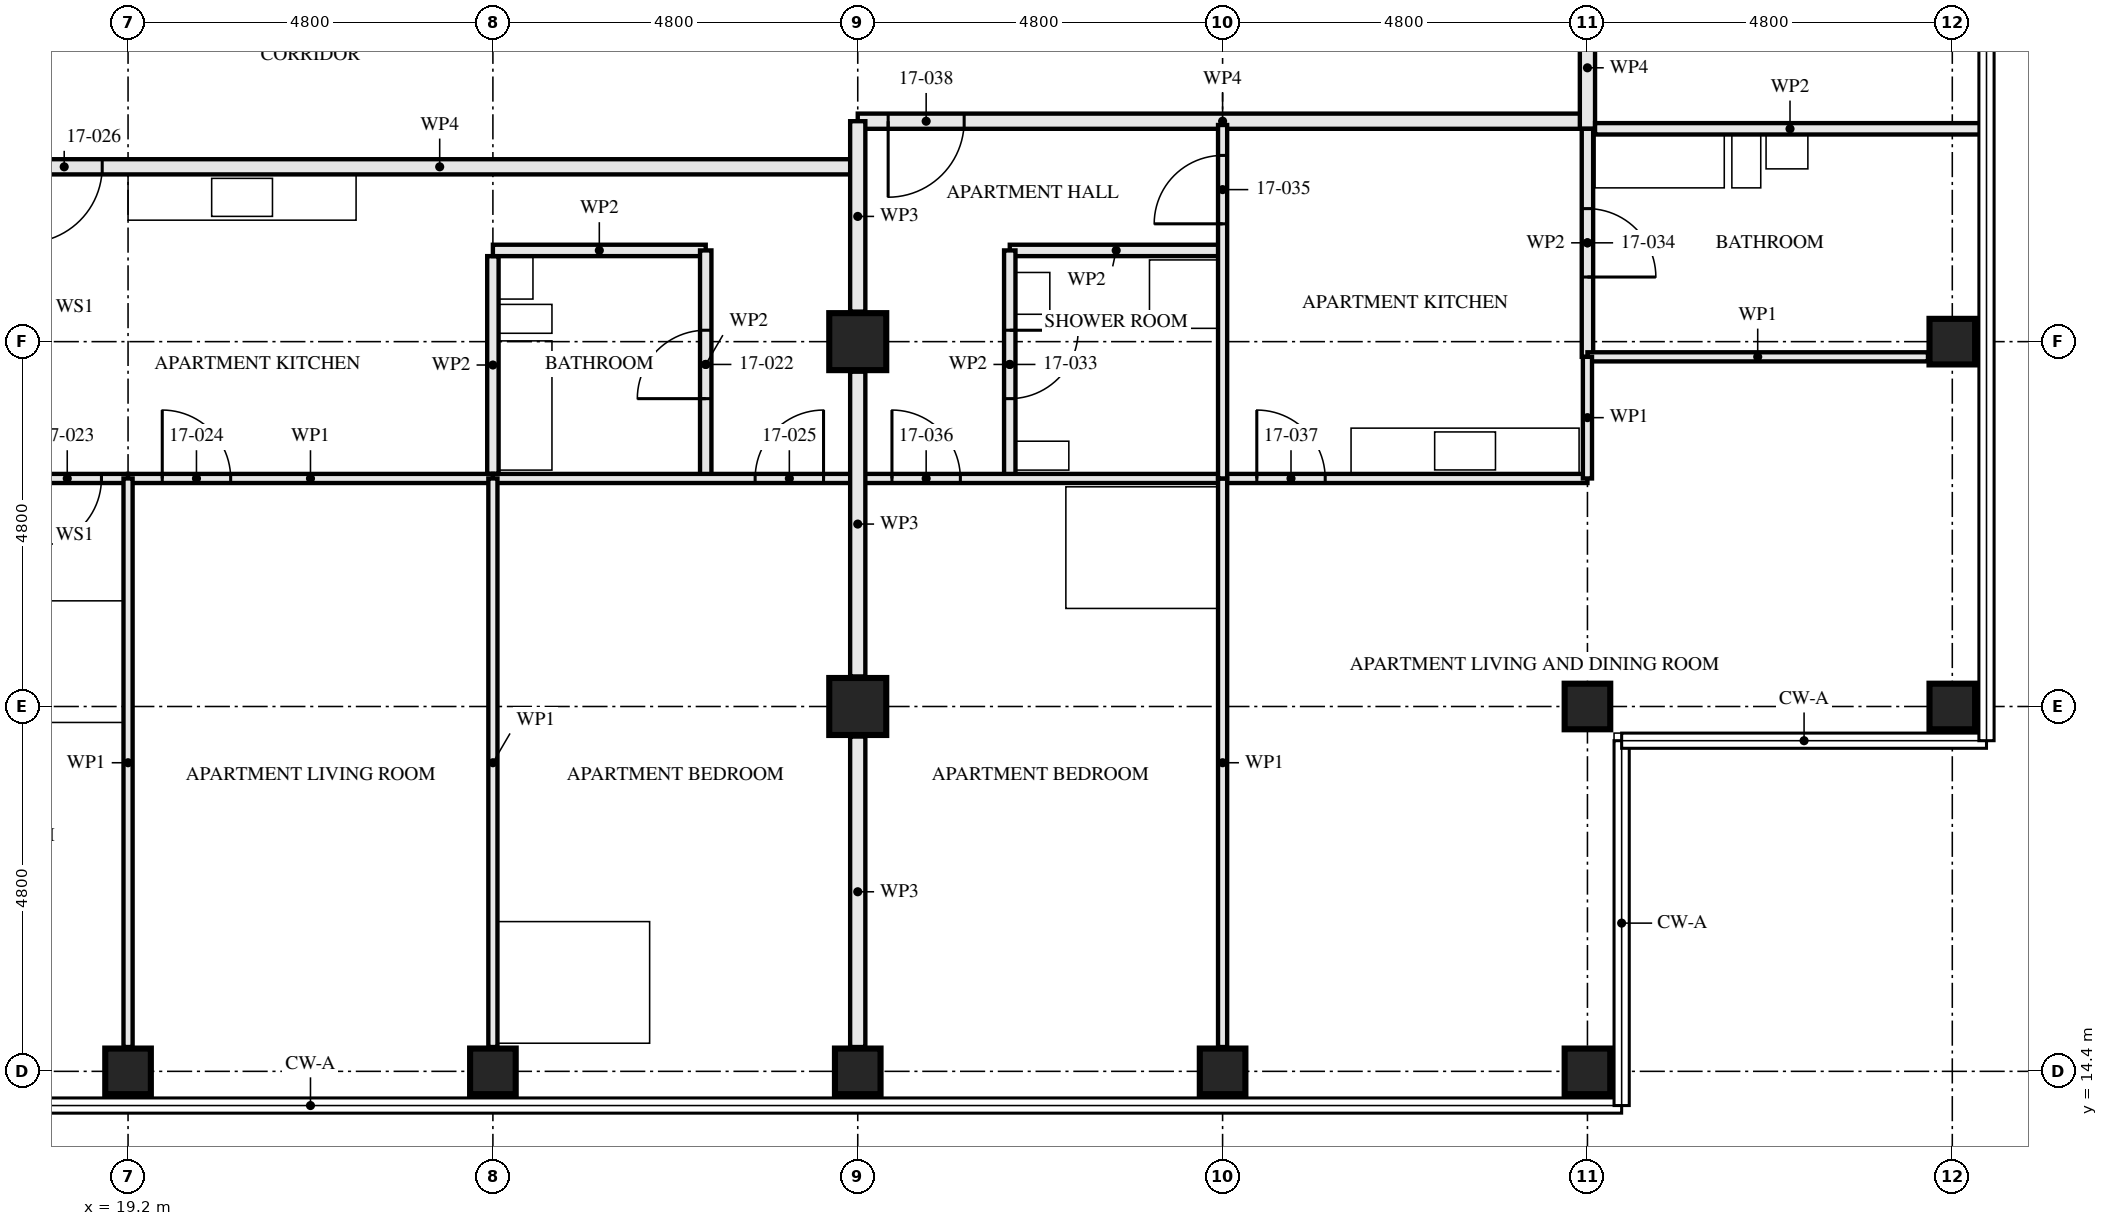
"""IFC4 building model, lengths in metres.
Left out: names, types, materials, properties, quantities, classifications, styles, units other than length and angle.
Written with IfcOpenShell. Run it as: python <this file> out.ifc"""

import sys

from ifc_helpers import new_model, si_unit, direction, frame, frame_2d, origin, origin_2d, place, context, subcontext, project, spatial, rectangle, hollow_rectangle, extrude, element, fill, save


model = new_model("IFC4")
c1 = context("Model", 3, precision=1e-05, world=origin(), true_north=direction((0.0, 1.0)))
c2 = subcontext(c1, "Body", "Model", "MODEL_VIEW")
j1 = project(units=[si_unit("LENGTHUNIT", "METRE"), si_unit("PLANEANGLEUNIT", "RADIAN")], contexts=[c1])
p1 = place(None, origin())
s1 = spatial("IfcSite", under=j1, at=p1, CompositionType="ELEMENT")
p2 = place(p1, origin())
s2 = spatial("IfcBuilding", under=s1, at=p2, CompositionType="ELEMENT")
p3 = place(p2, frame((0.0, 0.0, 65.5)))
s3 = spatial("IfcBuildingStorey", under=s2, at=p3, CompositionType="ELEMENT", Elevation=65.5)
for number, where, z_axis, x_axis in (
    (1, (19.2, 14.4, 0.0), (0.0, 0.0, 1.0), (0.0, 1.0, 0.0)),
    (2, (24.0, 14.4, 0.0), (0.0, 0.0, 1.0), (0.0, 1.0, 0.0)),
    (3, (28.8, 14.4, 0.0), (0.0, 0.0, 1.0), (0.0, 1.0, 0.0)),
):
    element("IfcColumn", number, at=place(p3, frame(where, z_axis=z_axis, x_axis=x_axis)), inside=s3, PredefinedType="COLUMN", context=c2, shape_type="SweptSolid", body=[
        extrude(hollow_rectangle(XDim=0.6, YDim=0.6, WallThickness=0.08, at=origin_2d()), origin(), (0.0, 0.0, 1.0), 3.5),
    ])
for number, where, z_axis, x_axis in (
    (4, (28.8, 19.2, 0.0), (0.0, 0.0, 1.0), (1.0, 0.0, 0.0)),
    (5, (28.8, 24.0, 0.0), (0.0, 0.0, 1.0), (1.0, 0.0, 0.0)),
):
    element("IfcColumn", number, at=place(p3, frame(where, z_axis=z_axis, x_axis=x_axis)), inside=s3, PredefinedType="COLUMN", context=c2, shape_type="SweptSolid", body=[
        extrude(hollow_rectangle(XDim=0.75, YDim=0.75, WallThickness=0.08, at=origin_2d()), origin(), (0.0, 0.0, 1.0), 3.5),
    ])
for number, where, z_axis, x_axis in (
    (6, (33.6, 14.4, 0.0), (0.0, 0.0, 1.0), (0.0, 1.0, 0.0)),
    (7, (38.4, 14.4, 0.0), (0.0, 0.0, 1.0), (0.0, 1.0, 0.0)),
    (8, (38.4, 19.2, 0.0), (0.0, 0.0, 1.0), (0.0, 1.0, 0.0)),
    (9, (43.2, 19.2, 0.0), (0.0, 0.0, 1.0), (0.0, 1.0, 0.0)),
    (10, (43.2, 24.0, 0.0), (0.0, 0.0, 1.0), (1.0, 0.0, 0.0)),
):
    element("IfcColumn", number, at=place(p3, frame(where, z_axis=z_axis, x_axis=x_axis)), inside=s3, PredefinedType="COLUMN", context=c2, shape_type="SweptSolid", body=[
        extrude(hollow_rectangle(XDim=0.6, YDim=0.6, WallThickness=0.08, at=origin_2d()), origin(), (0.0, 0.0, 1.0), 3.5),
    ])
p4 = place(p3, frame((26.8, 22.2, 0.0), z_axis=(0.0, 0.0, 1.0), x_axis=(0.0, 1.0, 0.0)))
e11 = element("IfcWall", 11, at=p4, inside=s3, PredefinedType="PARTITIONING", context=c2, shape_type="SweptSolid", body=[
    extrude(rectangle(XDim=3.0, YDim=0.15, at=frame_2d((1.5, 0.0))), origin(), (0.0, 0.0, 1.0), 2.55),
])
p5 = place(p4, frame((1.05, 0.0, 0.0)))
e12 = element("IfcOpeningElement", 12, at=p5, cuts=e11, PredefinedType="OPENING", context=c2, shape_type="SweptSolid", body=[
    extrude(rectangle(XDim=0.9, YDim=2.1, at=frame_2d((0.45, 1.05))), frame((0.0, 0.085, 0.0), z_axis=(0.0, -1.0, 0.0), x_axis=(1.0, 0.0, 0.0)), (0.0, 0.0, 1.0), 0.171),
])
p6 = place(p3, frame((24.0, 25.2, 0.0), z_axis=(0.0, 0.0, 1.0), x_axis=(1.0, 0.0, 0.0)))
e13 = element("IfcWall", 13, at=p6, inside=s3, PredefinedType="PARTITIONING", context=c2, shape_type="SweptSolid", body=[
    extrude(rectangle(XDim=2.8, YDim=0.15, at=frame_2d((1.4, 0.0))), origin(), (0.0, 0.0, 1.0), 3.33),
])
p7 = place(p3, frame((17.8, 22.2, 0.0), z_axis=(0.0, 0.0, 1.0), x_axis=(1.0, 0.0, 0.0)))
e14 = element("IfcWall", 14, at=p7, inside=s3, PredefinedType="PARTITIONING", context=c2, shape_type="SweptSolid", body=[
    extrude(rectangle(XDim=1.4, YDim=0.12, at=frame_2d((0.7, 0.0))), origin(), (0.0, 0.0, 1.0), 3.33),
])
p8 = place(p7, frame((0.15, 0.0, 0.0)))
e15 = element("IfcOpeningElement", 15, at=p8, cuts=e14, PredefinedType="OPENING", context=c2, shape_type="SweptSolid", body=[
    extrude(rectangle(XDim=0.9, YDim=2.1, at=frame_2d((0.45, 1.05))), frame((0.0, 0.071, 0.0), z_axis=(0.0, -1.0, 0.0), x_axis=(1.0, 0.0, 0.0)), (0.0, 0.0, 1.0), 0.141),
])
p9 = place(p3, frame((19.2, 22.2, 0.0), z_axis=(0.0, 0.0, 1.0), x_axis=(1.0, 0.0, 0.0)))
e16 = element("IfcWall", 16, at=p9, inside=s3, PredefinedType="PARTITIONING", context=c2, shape_type="SweptSolid", body=[
    extrude(rectangle(XDim=4.8, YDim=0.12, at=frame_2d((2.4, 0.0))), origin(), (0.0, 0.0, 1.0), 3.33),
])
p10 = place(p9, frame((0.45, 0.0, 0.0)))
e17 = element("IfcOpeningElement", 17, at=p10, cuts=e16, PredefinedType="OPENING", context=c2, shape_type="SweptSolid", body=[
    extrude(rectangle(XDim=0.9, YDim=2.1, at=frame_2d((0.45, 1.05))), frame((0.0, 0.071, 0.0), z_axis=(0.0, -1.0, 0.0), x_axis=(1.0, 0.0, 0.0)), (0.0, 0.0, 1.0), 0.141),
])
p11 = place(p3, frame((24.0, 22.2, 0.0), z_axis=(0.0, 0.0, 1.0), x_axis=(1.0, 0.0, 0.0)))
e18 = element("IfcWall", 18, at=p11, inside=s3, PredefinedType="PARTITIONING", context=c2, shape_type="SweptSolid", body=[
    extrude(rectangle(XDim=4.8, YDim=0.12, at=frame_2d((2.4, 0.0))), origin(), (0.0, 0.0, 1.0), 3.33),
])
p12 = place(p11, frame((3.45, 0.0, 0.0)))
e19 = element("IfcOpeningElement", 19, at=p12, cuts=e18, PredefinedType="OPENING", context=c2, shape_type="SweptSolid", body=[
    extrude(rectangle(XDim=0.9, YDim=2.1, at=frame_2d((0.45, 1.05))), frame((0.0, 0.071, 0.0), z_axis=(0.0, -1.0, 0.0), x_axis=(1.0, 0.0, 0.0)), (0.0, 0.0, 1.0), 0.141),
])
for number, where, z_axis, x_axis in (
    (20, (19.2, 14.72, 0.0), (0.0, 0.0, 1.0), (0.0, 1.0, 0.0)),
    (21, (24.0, 14.72, 0.0), (0.0, 0.0, 1.0), (0.0, 1.0, 0.0)),
):
    element("IfcWall", number, at=place(p3, frame(where, z_axis=z_axis, x_axis=x_axis)), inside=s3, PredefinedType="PARTITIONING", context=c2, shape_type="SweptSolid", body=[
        extrude(rectangle(XDim=7.48, YDim=0.12, at=frame_2d((3.74, 0.0))), origin(), (0.0, 0.0, 1.0), 2.55),
    ])
p13 = place(p3, frame((17.8, 26.3, 0.0), z_axis=(0.0, 0.0, 1.0), x_axis=(1.0, 0.0, 0.0)))
e22 = element("IfcWall", 22, at=p13, inside=s3, PredefinedType="PARTITIONING", context=c2, shape_type="SweptSolid", body=[
    extrude(rectangle(XDim=11.0, YDim=0.2, at=frame_2d((5.5, 0.0))), origin(), (0.0, 0.0, 1.0), 2.55),
])
p14 = place(p13, frame((0.06, 0.0, 0.0)))
e23 = element("IfcOpeningElement", 23, at=p14, cuts=e22, PredefinedType="OPENING", context=c2, shape_type="SweptSolid", body=[
    extrude(rectangle(XDim=1.0, YDim=2.1, at=frame_2d((0.5, 1.05))), frame((0.0, 0.111, 0.0), z_axis=(0.0, -1.0, 0.0), x_axis=(1.0, 0.0, 0.0)), (0.0, 0.0, 1.0), 0.221),
])
p15 = place(p3, frame((30.8, 22.2, 0.0), z_axis=(0.0, 0.0, 1.0), x_axis=(0.0, 1.0, 0.0)))
e24 = element("IfcWall", 24, at=p15, inside=s3, PredefinedType="PARTITIONING", context=c2, shape_type="SweptSolid", body=[
    extrude(rectangle(XDim=3.0, YDim=0.15, at=frame_2d((1.5, 0.0))), origin(), (0.0, 0.0, 1.0), 2.55),
])
p16 = place(p15, frame((1.05, 0.0, 0.0)))
e25 = element("IfcOpeningElement", 25, at=p16, cuts=e24, PredefinedType="OPENING", context=c2, shape_type="SweptSolid", body=[
    extrude(rectangle(XDim=0.9, YDim=2.1, at=frame_2d((0.45, 1.05))), frame((0.0, 0.085, 0.0), z_axis=(0.0, -1.0, 0.0), x_axis=(1.0, 0.0, 0.0)), (0.0, 0.0, 1.0), 0.171),
])
p17 = place(p3, frame((30.8, 25.2, 0.0), z_axis=(0.0, 0.0, 1.0), x_axis=(1.0, 0.0, 0.0)))
e26 = element("IfcWall", 26, at=p17, inside=s3, PredefinedType="PARTITIONING", context=c2, shape_type="SweptSolid", body=[
    extrude(rectangle(XDim=2.8, YDim=0.15, at=frame_2d((1.4, 0.0))), origin(), (0.0, 0.0, 1.0), 3.33),
])
p18 = place(p3, frame((38.4, 23.8, 0.0), z_axis=(0.0, 0.0, 1.0), x_axis=(0.0, 1.0, 0.0)))
e27 = element("IfcWall", 27, at=p18, inside=s3, PredefinedType="PARTITIONING", context=c2, shape_type="SweptSolid", body=[
    extrude(rectangle(XDim=3.0, YDim=0.15, at=frame_2d((1.5, 0.0))), origin(), (0.0, 0.0, 1.0), 2.55),
])
p19 = place(p18, frame((1.05, 0.0, 0.0)))
e28 = element("IfcOpeningElement", 28, at=p19, cuts=e27, PredefinedType="OPENING", context=c2, shape_type="SweptSolid", body=[
    extrude(rectangle(XDim=0.9, YDim=2.1, at=frame_2d((0.45, 1.05))), frame((0.0, 0.085, 0.0), z_axis=(0.0, -1.0, 0.0), x_axis=(1.0, 0.0, 0.0)), (0.0, 0.0, 1.0), 0.171),
])
p20 = place(p3, frame((33.6, 22.2, 0.0), z_axis=(0.0, 0.0, 1.0), x_axis=(0.0, 1.0, 0.0)))
e29 = element("IfcWall", 29, at=p20, inside=s3, PredefinedType="PARTITIONING", context=c2, shape_type="SweptSolid", body=[
    extrude(rectangle(XDim=4.65, YDim=0.12, at=frame_2d((2.325, 0.0))), origin(), (0.0, 0.0, 1.0), 2.55),
])
p21 = place(p20, frame((3.35, 0.0, 0.0)))
e30 = element("IfcOpeningElement", 30, at=p21, cuts=e29, PredefinedType="OPENING", context=c2, shape_type="SweptSolid", body=[
    extrude(rectangle(XDim=0.9, YDim=2.1, at=frame_2d((0.45, 1.05))), frame((0.0, 0.071, 0.0), z_axis=(0.0, -1.0, 0.0), x_axis=(1.0, 0.0, 0.0)), (0.0, 0.0, 1.0), 0.141),
])
p22 = place(p3, frame((28.8, 22.2, 0.0), z_axis=(0.0, 0.0, 1.0), x_axis=(1.0, 0.0, 0.0)))
e31 = element("IfcWall", 31, at=p22, inside=s3, PredefinedType="PARTITIONING", context=c2, shape_type="SweptSolid", body=[
    extrude(rectangle(XDim=4.8, YDim=0.12, at=frame_2d((2.4, 0.0))), origin(), (0.0, 0.0, 1.0), 3.33),
])
p23 = place(p22, frame((0.45, 0.0, 0.0)))
e32 = element("IfcOpeningElement", 32, at=p23, cuts=e31, PredefinedType="OPENING", context=c2, shape_type="SweptSolid", body=[
    extrude(rectangle(XDim=0.9, YDim=2.1, at=frame_2d((0.45, 1.05))), frame((0.0, 0.071, 0.0), z_axis=(0.0, -1.0, 0.0), x_axis=(1.0, 0.0, 0.0)), (0.0, 0.0, 1.0), 0.141),
])
p24 = place(p3, frame((33.6, 22.2, 0.0), z_axis=(0.0, 0.0, 1.0), x_axis=(1.0, 0.0, 0.0)))
e33 = element("IfcWall", 33, at=p24, inside=s3, PredefinedType="PARTITIONING", context=c2, shape_type="SweptSolid", body=[
    extrude(rectangle(XDim=4.8, YDim=0.12, at=frame_2d((2.4, 0.0))), origin(), (0.0, 0.0, 1.0), 3.33),
])
p25 = place(p24, frame((0.45, 0.0, 0.0)))
e34 = element("IfcOpeningElement", 34, at=p25, cuts=e33, PredefinedType="OPENING", context=c2, shape_type="SweptSolid", body=[
    extrude(rectangle(XDim=0.9, YDim=2.1, at=frame_2d((0.45, 1.05))), frame((0.0, 0.071, 0.0), z_axis=(0.0, -1.0, 0.0), x_axis=(1.0, 0.0, 0.0)), (0.0, 0.0, 1.0), 0.141),
])
p26 = place(p3, frame((38.4, 23.8, 0.0), z_axis=(0.0, 0.0, 1.0), x_axis=(1.0, 0.0, 0.0)))
e35 = element("IfcWall", 35, at=p26, inside=s3, PredefinedType="PARTITIONING", context=c2, shape_type="SweptSolid", body=[
    extrude(rectangle(XDim=4.48, YDim=0.12, at=frame_2d((2.24, 0.0))), origin(), (0.0, 0.0, 1.0), 3.33),
])
p27 = place(p3, frame((33.6, 14.72, 0.0), z_axis=(0.0, 0.0, 1.0), x_axis=(0.0, 1.0, 0.0)))
e36 = element("IfcWall", 36, at=p27, inside=s3, PredefinedType="PARTITIONING", context=c2, shape_type="SweptSolid", body=[
    extrude(rectangle(XDim=7.48, YDim=0.12, at=frame_2d((3.74, 0.0))), origin(), (0.0, 0.0, 1.0), 2.55),
])
p28 = place(p3, frame((38.4, 22.2, 0.0), z_axis=(0.0, 0.0, 1.0), x_axis=(0.0, 1.0, 0.0)))
e37 = element("IfcWall", 37, at=p28, inside=s3, PredefinedType="PARTITIONING", context=c2, shape_type="SweptSolid", body=[
    extrude(rectangle(XDim=1.6, YDim=0.12, at=frame_2d((0.8, 0.0))), origin(), (0.0, 0.0, 1.0), 3.33),
])
p29 = place(p3, frame((28.8, 26.9, 0.0), z_axis=(0.0, 0.0, 1.0), x_axis=(1.0, 0.0, 0.0)))
e38 = element("IfcWall", 38, at=p29, inside=s3, PredefinedType="PARTITIONING", context=c2, shape_type="SweptSolid", body=[
    extrude(rectangle(XDim=9.6, YDim=0.2, at=frame_2d((4.8, 0.0))), origin(), (0.0, 0.0, 1.0), 3.33),
])
p30 = place(p29, frame((0.4, 0.0, 0.0)))
e39 = element("IfcOpeningElement", 39, at=p30, cuts=e38, PredefinedType="OPENING", context=c2, shape_type="SweptSolid", body=[
    extrude(rectangle(XDim=1.0, YDim=2.1, at=frame_2d((0.5, 1.05))), frame((0.0, 0.111, 0.0), z_axis=(0.0, -1.0, 0.0), x_axis=(1.0, 0.0, 0.0)), (0.0, 0.0, 1.0), 0.221),
])
p31 = place(p3, frame((38.4, 26.8, 0.0), z_axis=(0.0, 0.0, 1.0), x_axis=(0.0, 1.0, 0.0)))
e40 = element("IfcWall", 40, at=p31, inside=s3, PredefinedType="PARTITIONING", context=c2, shape_type="SweptSolid", body=[
    extrude(rectangle(XDim=1.605, YDim=0.2, at=frame_2d((0.802, 0.0))), origin(), (0.0, 0.0, 1.0), 3.33),
])
p32 = place(p3, frame((28.8, 14.72, 0.0), z_axis=(0.0, 0.0, 1.0), x_axis=(0.0, 1.0, 0.0)))
e41 = element("IfcWall", 41, at=p32, inside=s3, PredefinedType="PARTITIONING", context=c2, shape_type="SweptSolid", body=[
    extrude(rectangle(XDim=4.085, YDim=0.2, at=frame_2d((2.042, 0.0))), origin(), (0.0, 0.0, 1.0), 2.32),
])
p33 = place(p3, frame((28.8, 19.595, 0.0), z_axis=(0.0, 0.0, 1.0), x_axis=(0.0, 1.0, 0.0)))
e42 = element("IfcWall", 42, at=p33, inside=s3, PredefinedType="PARTITIONING", context=c2, shape_type="SweptSolid", body=[
    extrude(rectangle(XDim=4.01, YDim=0.2, at=frame_2d((2.005, 0.0))), origin(), (0.0, 0.0, 1.0), 2.32),
])
p34 = place(p3, frame((28.8, 24.395, 0.0), z_axis=(0.0, 0.0, 1.0), x_axis=(0.0, 1.0, 0.0)))
e43 = element("IfcWall", 43, at=p34, inside=s3, PredefinedType="PARTITIONING", context=c2, shape_type="SweptSolid", body=[
    extrude(rectangle(XDim=2.505, YDim=0.2, at=frame_2d((1.252, 0.0))), origin(), (0.0, 0.0, 1.0), 2.32),
])
p35 = place(p3, frame((24.0, 22.26, 0.0), z_axis=(0.0, 0.0, 1.0), x_axis=(0.0, 1.0, 0.0)))
e44 = element("IfcWall", 44, at=p35, inside=s3, PredefinedType="PARTITIONING", context=c2, shape_type="SweptSolid", body=[
    extrude(rectangle(XDim=2.865, YDim=0.15, at=frame_2d((1.433, 0.0))), origin(), (0.0, 0.0, 1.0), 2.55),
])
p36 = place(p3, frame((38.5, 26.8, 0.0), z_axis=(0.0, 0.0, 1.0), x_axis=(1.0, 0.0, 0.0)))
e45 = element("IfcWall", 45, at=p36, inside=s3, PredefinedType="PARTITIONING", context=c2, shape_type="SweptSolid", body=[
    extrude(rectangle(XDim=5.13, YDim=0.15, at=frame_2d((2.565, 0.0))), origin(), (0.0, 0.0, 1.0), 2.32),
])
p37 = place(p5, origin())
e46 = element("IfcDoor", 46, at=p37, inside=s3, OperationType="SINGLE_SWING_RIGHT", PredefinedType="DOOR", context=c2, shape_type="SweptSolid", body=[
    extrude(rectangle(XDim=0.9, YDim=2.1, at=frame_2d((0.45, 1.05))), frame((0.0, 0.022, 0.0), z_axis=(0.0, -1.0, 0.0), x_axis=(1.0, 0.0, 0.0)), (0.0, 0.0, 1.0), 0.044),
])
fill(e12, e46)
p38 = place(p8, frame((0.9, 0.0, 0.0), z_axis=(0.0, 0.0, 1.0), x_axis=(-1.0, 0.0, 0.0)))
e47 = element("IfcDoor", 47, at=p38, inside=s3, OperationType="SINGLE_SWING_LEFT", PredefinedType="DOOR", context=c2, shape_type="SweptSolid", body=[
    extrude(rectangle(XDim=0.9, YDim=2.1, at=frame_2d((0.45, 1.05))), frame((0.0, 0.022, 0.0), z_axis=(0.0, -1.0, 0.0), x_axis=(1.0, 0.0, 0.0)), (0.0, 0.0, 1.0), 0.044),
])
fill(e15, e47)
p39 = place(p10, origin())
e48 = element("IfcDoor", 48, at=p39, inside=s3, OperationType="SINGLE_SWING_RIGHT", PredefinedType="DOOR", context=c2, shape_type="SweptSolid", body=[
    extrude(rectangle(XDim=0.9, YDim=2.1, at=frame_2d((0.45, 1.05))), frame((0.0, 0.022, 0.0), z_axis=(0.0, -1.0, 0.0), x_axis=(1.0, 0.0, 0.0)), (0.0, 0.0, 1.0), 0.044),
])
fill(e17, e48)
p40 = place(p12, origin())
e49 = element("IfcDoor", 49, at=p40, inside=s3, OperationType="SINGLE_SWING_LEFT", PredefinedType="DOOR", context=c2, shape_type="SweptSolid", body=[
    extrude(rectangle(XDim=0.9, YDim=2.1, at=frame_2d((0.45, 1.05))), frame((0.0, 0.022, 0.0), z_axis=(0.0, -1.0, 0.0), x_axis=(1.0, 0.0, 0.0)), (0.0, 0.0, 1.0), 0.044),
])
fill(e19, e49)
p41 = place(p14, frame((1.0, 0.0, 0.0), z_axis=(0.0, 0.0, 1.0), x_axis=(-1.0, 0.0, 0.0)))
e50 = element("IfcDoor", 50, at=p41, inside=s3, OperationType="SINGLE_SWING_LEFT", PredefinedType="DOOR", context=c2, shape_type="SweptSolid", body=[
    extrude(rectangle(XDim=1.0, YDim=2.1, at=frame_2d((0.5, 1.05))), frame((0.0, 0.027, 0.0), z_axis=(0.0, -1.0, 0.0), x_axis=(1.0, 0.0, 0.0)), (0.0, 0.0, 1.0), 0.054),
])
fill(e23, e50)
p42 = place(p16, frame((0.9, 0.0, 0.0), z_axis=(0.0, 0.0, 1.0), x_axis=(-1.0, 0.0, 0.0)))
e51 = element("IfcDoor", 51, at=p42, inside=s3, OperationType="SINGLE_SWING_RIGHT", PredefinedType="DOOR", context=c2, shape_type="SweptSolid", body=[
    extrude(rectangle(XDim=0.9, YDim=2.1, at=frame_2d((0.45, 1.05))), frame((0.0, 0.022, 0.0), z_axis=(0.0, -1.0, 0.0), x_axis=(1.0, 0.0, 0.0)), (0.0, 0.0, 1.0), 0.044),
])
fill(e25, e51)
p43 = place(p19, frame((0.9, 0.0, 0.0), z_axis=(0.0, 0.0, 1.0), x_axis=(-1.0, 0.0, 0.0)))
e52 = element("IfcDoor", 52, at=p43, inside=s3, OperationType="SINGLE_SWING_LEFT", PredefinedType="DOOR", context=c2, shape_type="SweptSolid", body=[
    extrude(rectangle(XDim=0.9, YDim=2.1, at=frame_2d((0.45, 1.05))), frame((0.0, 0.022, 0.0), z_axis=(0.0, -1.0, 0.0), x_axis=(1.0, 0.0, 0.0)), (0.0, 0.0, 1.0), 0.044),
])
fill(e28, e52)
p44 = place(p21, origin())
e53 = element("IfcDoor", 53, at=p44, inside=s3, OperationType="SINGLE_SWING_RIGHT", PredefinedType="DOOR", context=c2, shape_type="SweptSolid", body=[
    extrude(rectangle(XDim=0.9, YDim=2.1, at=frame_2d((0.45, 1.05))), frame((0.0, 0.022, 0.0), z_axis=(0.0, -1.0, 0.0), x_axis=(1.0, 0.0, 0.0)), (0.0, 0.0, 1.0), 0.044),
])
fill(e30, e53)
p45 = place(p23, origin())
e54 = element("IfcDoor", 54, at=p45, inside=s3, OperationType="SINGLE_SWING_RIGHT", PredefinedType="DOOR", context=c2, shape_type="SweptSolid", body=[
    extrude(rectangle(XDim=0.9, YDim=2.1, at=frame_2d((0.45, 1.05))), frame((0.0, 0.022, 0.0), z_axis=(0.0, -1.0, 0.0), x_axis=(1.0, 0.0, 0.0)), (0.0, 0.0, 1.0), 0.044),
])
fill(e32, e54)
p46 = place(p25, origin())
e55 = element("IfcDoor", 55, at=p46, inside=s3, OperationType="SINGLE_SWING_RIGHT", PredefinedType="DOOR", context=c2, shape_type="SweptSolid", body=[
    extrude(rectangle(XDim=0.9, YDim=2.1, at=frame_2d((0.45, 1.05))), frame((0.0, 0.022, 0.0), z_axis=(0.0, -1.0, 0.0), x_axis=(1.0, 0.0, 0.0)), (0.0, 0.0, 1.0), 0.044),
])
fill(e34, e55)
p47 = place(p30, frame((1.0, 0.0, 0.0), z_axis=(0.0, 0.0, 1.0), x_axis=(-1.0, 0.0, 0.0)))
e56 = element("IfcDoor", 56, at=p47, inside=s3, OperationType="SINGLE_SWING_LEFT", PredefinedType="DOOR", context=c2, shape_type="SweptSolid", body=[
    extrude(rectangle(XDim=1.0, YDim=2.1, at=frame_2d((0.5, 1.05))), frame((0.0, 0.027, 0.0), z_axis=(0.0, -1.0, 0.0), x_axis=(1.0, 0.0, 0.0)), (0.0, 0.0, 1.0), 0.054),
])
fill(e39, e56)
save(model, sys.argv[1])
